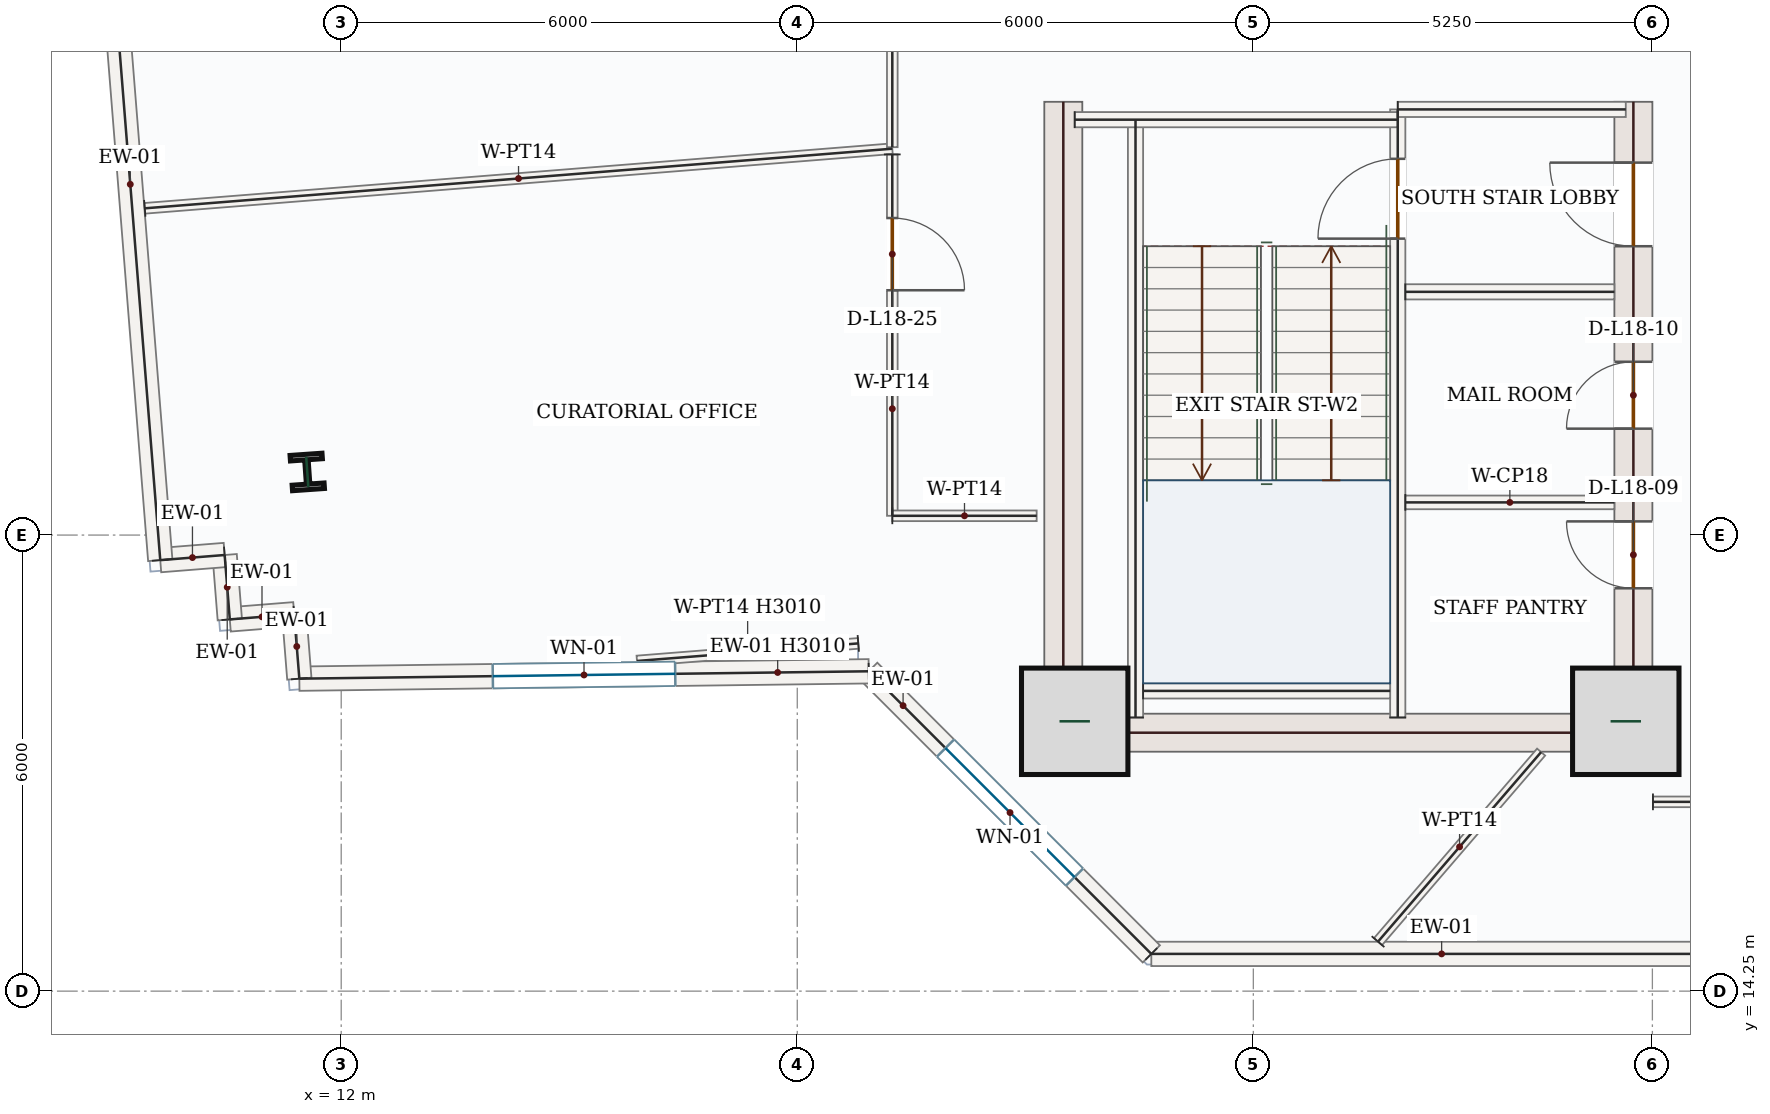
"""IFC4 building model, lengths in metres.
Left out: names, types, materials, properties, quantities, classifications, styles, units other than length and angle.
Written with IfcOpenShell. Run it as: python <this file> out.ifc"""

import sys

from ifc_helpers import new_model, si_unit, direction, frame, frame_2d, origin, origin_2d, place, context, subcontext, project, spatial, rectangle, i_section, extrude, source, transform, mapped, element, fill, save


model = new_model("IFC4")
c1 = context("Model", 3, precision=1e-05, world=origin(), true_north=direction((0.0, 1.0)))
c2 = subcontext(c1, "Body", "Model", "MODEL_VIEW")
j1 = project(units=[si_unit("LENGTHUNIT", "METRE"), si_unit("PLANEANGLEUNIT", "RADIAN")], contexts=[c1])
p1 = place(None, origin())
s1 = spatial("IfcSite", under=j1, at=p1, CompositionType="ELEMENT")
p2 = place(p1, origin())
s2 = spatial("IfcBuilding", under=s1, at=p2, CompositionType="ELEMENT")
p3 = place(p2, frame((0.0, 0.0, 83.7)))
s3 = spatial("IfcBuildingStorey", under=s2, at=p3, CompositionType="ELEMENT", Elevation=83.7)
m1 = source(origin(), c2, "Body", "SweptSolid", [
    extrude(rectangle(XDim=8.55, YDim=0.5, at=frame_2d((4.275, 0.0))), origin(), (0.0, 0.0, 1.0), 3.95),
])
p4 = place(p3, frame((21.5, 17.4, 0.0), z_axis=(0.0, 0.0, 1.0), x_axis=(0.0, 1.0, 0.0)))
e1 = element("IfcWall", 1, at=p4, inside=s3, PredefinedType="SHEAR", context=c2, shape_type="MappedRepresentation", body=[
    mapped(m1, transform((0.0, 0.0, 0.0), x_axis=(1.0, 0.0, 0.0), y_axis=(0.0, 1.0, 0.0), z_axis=(0.0, 0.0, 1.0), scale=1.0)),
])
p5 = place(p3, frame((29.0, 17.4, 0.0), z_axis=(0.0, 0.0, 1.0), x_axis=(0.0, 1.0, 0.0)))
e2 = element("IfcWall", 2, at=p5, inside=s3, PredefinedType="SHEAR", context=c2, shape_type="SweptSolid", body=[
    extrude(rectangle(XDim=8.55, YDim=0.5, at=frame_2d((4.275, 0.0))), origin(), (0.0, 0.0, 1.0), 3.95),
])
p6 = place(p5, frame((6.65, 0.0, 0.0)))
e3 = element("IfcOpeningElement", 3, at=p6, cuts=e2, PredefinedType="OPENING", context=c2, shape_type="SweptSolid", body=[
    extrude(rectangle(XDim=1.1, YDim=2.2, at=frame_2d((0.55, 1.1))), frame((0.0, 0.26, 0.0), z_axis=(0.0, -1.0, 0.0), x_axis=(1.0, 0.0, 0.0)), (0.0, 0.0, 1.0), 0.52),
])
p7 = place(p5, frame((2.15, 0.0, 0.0)))
e4 = element("IfcOpeningElement", 4, at=p7, cuts=e2, PredefinedType="OPENING", context=c2, shape_type="SweptSolid", body=[
    extrude(rectangle(XDim=0.88, YDim=2.1, at=frame_2d((0.44, 1.05))), frame((0.0, 0.26, 0.0), z_axis=(0.0, -1.0, 0.0), x_axis=(1.0, 0.0, 0.0)), (0.0, 0.0, 1.0), 0.52),
])
p8 = place(p5, frame((4.25, 0.0, 0.0)))
e5 = element("IfcOpeningElement", 5, at=p8, cuts=e2, PredefinedType="OPENING", context=c2, shape_type="SweptSolid", body=[
    extrude(rectangle(XDim=0.88, YDim=2.1, at=frame_2d((0.44, 1.05))), frame((0.0, 0.26, 0.0), z_axis=(0.0, -1.0, 0.0), x_axis=(1.0, 0.0, 0.0)), (0.0, 0.0, 1.0), 0.52),
])
m2 = source(origin(), c2, "Body", "SweptSolid", [
    extrude(rectangle(XDim=7.0, YDim=0.5, at=frame_2d((3.5, 0.0))), origin(), (0.0, 0.0, 1.0), 3.95),
])
p9 = place(p3, frame((21.75, 17.65, 0.0), z_axis=(0.0, 0.0, 1.0), x_axis=(1.0, 0.0, 0.0)))
e6 = element("IfcWall", 6, at=p9, inside=s3, PredefinedType="SHEAR", context=c2, shape_type="MappedRepresentation", body=[
    mapped(m2, transform((0.0, 0.0, 0.0), x_axis=(1.0, 0.0, 0.0), y_axis=(0.0, 1.0, 0.0), z_axis=(0.0, 0.0, 1.0), scale=1.0)),
])
m3 = source(origin(), c2, "Body", "SweptSolid", [
    extrude(rectangle(XDim=1.4, YDim=1.4, at=origin_2d()), origin(), (0.0, 0.0, 1.0), 4.2),
])
for number, where, z_axis, x_axis in (
    (7, (21.65, 17.8, 0.0), (0.0, 0.0, 1.0), (1.0, 0.0, 0.0)),
    (8, (28.9, 17.8, 0.0), (0.0, 0.0, 1.0), (1.0, 0.0, 0.0)),
):
    element("IfcColumn", number, at=place(p3, frame(where, z_axis=z_axis, x_axis=x_axis)), inside=s3, PredefinedType="COLUMN", context=c2, shape_type="MappedRepresentation", body=[
        mapped(m3, transform((0.0, 0.0, 0.0), x_axis=(1.0, 0.0, 0.0), y_axis=(0.0, 1.0, 0.0), z_axis=(0.0, 0.0, 1.0), scale=1.0)),
    ])
m4 = source(origin(), c2, "Body", "SweptSolid", [
    extrude(i_section(OverallWidth=0.421, OverallDepth=0.465, WebThickness=0.045, FlangeThickness=0.073, FilletRadius=0.018, at=origin_2d()), origin(), (0.0, 0.0, 1.0), 4.2),
])
p10 = place(p3, frame((11.553, 21.08, 0.0), z_axis=(0.0, 0.0, 1.0), x_axis=(0.99756405026, 0.069756473744, 0.0)))
e9 = element("IfcColumn", 9, at=p10, inside=s3, PredefinedType="COLUMN", context=c2, shape_type="MappedRepresentation", body=[
    mapped(m4, transform((0.0, 0.0, 0.0), x_axis=(1.0, 0.0, 0.0), y_axis=(0.0, 1.0, 0.0), z_axis=(0.0, 0.0, 1.0), scale=1.0)),
])
m5 = source(origin(), c2, "Body", "SweptSolid", [
    extrude(rectangle(XDim=7.639, YDim=0.32, at=frame_2d((3.819, 0.0))), origin(), (0.0, 0.0, 1.0), 3.95),
])
p11 = place(p3, frame((30.297, 14.74, 0.0), z_axis=(0.0, 0.0, 1.0), x_axis=(-1.0, 0.0, 0.0)))
e10 = element("IfcWall", 10, at=p11, inside=s3, PredefinedType="SOLIDWALL", context=c2, shape_type="MappedRepresentation", body=[
    mapped(m5, transform((0.0, 0.0, 0.0), x_axis=(1.0, 0.0, 0.0), y_axis=(0.0, 1.0, 0.0), z_axis=(0.0, 0.0, 1.0), scale=1.0)),
])
p12 = place(p3, frame((22.658, 14.74, 0.0), z_axis=(0.0, 0.0, 1.0), x_axis=(-0.707106781187, 0.707106781187, 0.0)))
e11 = element("IfcWall", 11, at=p12, inside=s3, PredefinedType="SOLIDWALL", context=c2, shape_type="SweptSolid", body=[
    extrude(rectangle(XDim=5.258, YDim=0.32, at=frame_2d((2.629, 0.0))), origin(), (0.0, 0.0, 1.0), 3.95),
])
p13 = place(p12, frame((1.429, 0.0, 0.85)))
e12 = element("IfcOpeningElement", 12, at=p13, cuts=e11, PredefinedType="OPENING", context=c2, shape_type="SweptSolid", body=[
    extrude(rectangle(XDim=2.4, YDim=1.8, at=frame_2d((1.2, 0.9))), frame((0.0, 0.17, 0.0), z_axis=(0.0, -1.0, 0.0), x_axis=(1.0, 0.0, 0.0)), (0.0, 0.0, 1.0), 0.34),
])
p14 = place(p3, frame((18.94, 18.458, 0.0), z_axis=(0.0, 0.0, 1.0), x_axis=(-0.999915877143, -0.012970683759, 0.0)))
e13 = element("IfcWall", 13, at=p14, inside=s3, PredefinedType="SOLIDWALL", context=c2, shape_type="SweptSolid", body=[
    extrude(rectangle(XDim=7.491, YDim=0.32, at=frame_2d((3.746, 0.0))), origin(), (0.0, 0.0, 1.0), 3.01),
])
p15 = place(p14, frame((2.546, 0.0, 0.85)))
e14 = element("IfcOpeningElement", 14, at=p15, cuts=e13, PredefinedType="OPENING", context=c2, shape_type="SweptSolid", body=[
    extrude(rectangle(XDim=2.4, YDim=1.8, at=frame_2d((1.2, 0.9))), frame((0.0, 0.17, 0.0), z_axis=(0.0, -1.0, 0.0), x_axis=(1.0, 0.0, 0.0)), (0.0, 0.0, 1.0), 0.34),
])
m6 = source(origin(), c2, "Body", "SweptSolid", [
    extrude(rectangle(XDim=0.85, YDim=0.32, at=frame_2d((0.425, 0.0))), origin(), (0.0, 0.0, 1.0), 3.95),
])
p16 = place(p3, frame((11.449, 18.361, 0.0), z_axis=(0.0, 0.0, 1.0), x_axis=(-0.079573954853, 0.996828965123, 0.0)))
e15 = element("IfcWall", 15, at=p16, inside=s3, PredefinedType="SOLIDWALL", context=c2, shape_type="MappedRepresentation", body=[
    mapped(m6, transform((0.0, 0.0, 0.0), x_axis=(1.0, 0.0, 0.0), y_axis=(0.0, 1.0, 0.0), z_axis=(0.0, 0.0, 1.0), scale=1.0)),
])
m7 = source(origin(), c2, "Body", "SweptSolid", [
    extrude(rectangle(XDim=0.85, YDim=0.32, at=frame_2d((0.425, 0.0))), origin(), (0.0, 0.0, 1.0), 3.95),
])
for number, where, z_axis, x_axis in (
    (16, (11.382, 19.208, 0.0), (0.0, 0.0, 1.0), (-0.997, -0.08, 0.0)),
    (17, (10.534, 19.14, 0.0), (0.0, 0.0, 1.0), (-0.08, 0.997, 0.0)),
):
    element("IfcWall", number, at=place(p3, frame(where, z_axis=z_axis, x_axis=x_axis)), inside=s3, PredefinedType="SOLIDWALL", context=c2, shape_type="MappedRepresentation", body=[
        mapped(m7, transform((0.0, 0.0, 0.0), x_axis=(1.0, 0.0, 0.0), y_axis=(0.0, 1.0, 0.0), z_axis=(0.0, 0.0, 1.0), scale=1.0)),
    ])
p17 = place(p3, frame((10.467, 19.988, 0.0), z_axis=(0.0, 0.0, 1.0), x_axis=(-0.996851711541, -0.079288493483, 0.0)))
e18 = element("IfcWall", 18, at=p17, inside=s3, PredefinedType="SOLIDWALL", context=c2, shape_type="MappedRepresentation", body=[
    mapped(m6, transform((0.0, 0.0, 0.0), x_axis=(1.0, 0.0, 0.0), y_axis=(0.0, 1.0, 0.0), z_axis=(0.0, 0.0, 1.0), scale=1.0)),
])
m8 = source(origin(), c2, "Body", "SweptSolid", [
    extrude(rectangle(XDim=9.92, YDim=0.32, at=frame_2d((4.96, 0.0))), origin(), (0.0, 0.0, 1.0), 3.95),
])
p18 = place(p3, frame((9.619, 19.92, 0.0), z_axis=(0.0, 0.0, 1.0), x_axis=(-0.07949480177, 0.996835280521, 0.0)))
e19 = element("IfcWall", 19, at=p18, inside=s3, PredefinedType="SOLIDWALL", context=c2, shape_type="MappedRepresentation", body=[
    mapped(m8, transform((0.0, 0.0, 0.0), x_axis=(1.0, 0.0, 0.0), y_axis=(0.0, 1.0, 0.0), z_axis=(0.0, 0.0, 1.0), scale=1.0)),
])
m9 = source(origin(), c2, "Body", "SweptSolid", [
    extrude(rectangle(XDim=7.87, YDim=0.2, at=frame_2d((3.935, 0.0))), origin(), (0.0, 0.0, 1.0), 3.95),
])
p19 = place(p3, frame((22.45, 17.85, 0.0), z_axis=(0.0, 0.0, 1.0), x_axis=(0.0, 1.0, 0.0)))
e20 = element("IfcWall", 20, at=p19, inside=s3, PredefinedType="SOLIDWALL", context=c2, shape_type="MappedRepresentation", body=[
    mapped(m9, transform((0.0, 0.0, 0.0), x_axis=(1.0, 0.0, 0.0), y_axis=(0.0, 1.0, 0.0), z_axis=(0.0, 0.0, 1.0), scale=1.0)),
])
p20 = place(p3, frame((25.9, 17.85, 0.0), z_axis=(0.0, 0.0, 1.0), x_axis=(0.0, 1.0, 0.0)))
e21 = element("IfcWall", 21, at=p20, inside=s3, PredefinedType="SOLIDWALL", context=c2, shape_type="SweptSolid", body=[
    extrude(rectangle(XDim=8.0, YDim=0.2, at=frame_2d((4.0, 0.0))), origin(), (0.0, 0.0, 1.0), 3.95),
])
p21 = place(p20, frame((6.3, 0.0, 0.0)))
e22 = element("IfcOpeningElement", 22, at=p21, cuts=e21, PredefinedType="OPENING", context=c2, shape_type="SweptSolid", body=[
    extrude(rectangle(XDim=1.05, YDim=2.15, at=frame_2d((0.525, 1.075))), frame((0.0, 0.11, 0.0), z_axis=(0.0, -1.0, 0.0), x_axis=(1.0, 0.0, 0.0)), (0.0, 0.0, 1.0), 0.22),
])
m10 = source(origin(), c2, "Body", "SweptSolid", [
    extrude(rectangle(XDim=4.25, YDim=0.2, at=frame_2d((2.125, 0.0))), origin(), (0.0, 0.0, 1.0), 3.95),
])
p22 = place(p3, frame((21.65, 25.715, 0.0), z_axis=(0.0, 0.0, 1.0), x_axis=(1.0, 0.0, 0.0)))
e23 = element("IfcWall", 23, at=p22, inside=s3, PredefinedType="SOLIDWALL", context=c2, shape_type="MappedRepresentation", body=[
    mapped(m10, transform((0.0, 0.0, 0.0), x_axis=(1.0, 0.0, 0.0), y_axis=(0.0, 1.0, 0.0), z_axis=(0.0, 0.0, 1.0), scale=1.0)),
])
m11 = source(origin(), c2, "Body", "SweptSolid", [
    extrude(rectangle(XDim=3.0, YDim=0.2, at=frame_2d((1.5, 0.0))), origin(), (0.0, 0.0, 1.0), 3.95),
])
p23 = place(p3, frame((25.9, 25.85, 0.0), z_axis=(0.0, 0.0, 1.0), x_axis=(1.0, 0.0, 0.0)))
e24 = element("IfcWall", 24, at=p23, inside=s3, PredefinedType="SOLIDWALL", context=c2, shape_type="MappedRepresentation", body=[
    mapped(m11, transform((0.0, 0.0, 0.0), x_axis=(1.0, 0.0, 0.0), y_axis=(0.0, 1.0, 0.0), z_axis=(0.0, 0.0, 1.0), scale=1.0)),
])
m12 = source(origin(), c2, "Body", "SweptSolid", [
    extrude(rectangle(XDim=3.25, YDim=0.2, at=frame_2d((1.625, 0.0))), origin(), (0.0, 0.0, 1.0), 3.95),
])
p24 = place(p3, frame((22.55, 18.2, 0.0), z_axis=(0.0, 0.0, 1.0), x_axis=(1.0, 0.0, 0.0)))
e25 = element("IfcWall", 25, at=p24, inside=s3, PredefinedType="SOLIDWALL", context=c2, shape_type="MappedRepresentation", body=[
    mapped(m12, transform((0.0, 0.0, 0.0), x_axis=(1.0, 0.0, 0.0), y_axis=(0.0, 1.0, 0.0), z_axis=(0.0, 0.0, 1.0), scale=1.0)),
])
m13 = source(origin(), c2, "Body", "SweptSolid", [
    extrude(rectangle(XDim=2.75, YDim=0.2, at=frame_2d((1.375, 0.0))), origin(), (0.0, 0.0, 1.0), 3.95),
])
p25 = place(p3, frame((26.0, 23.45, 0.0), z_axis=(0.0, 0.0, 1.0), x_axis=(1.0, 0.0, 0.0)))
e26 = element("IfcWall", 26, at=p25, inside=s3, PredefinedType="SOLIDWALL", context=c2, shape_type="MappedRepresentation", body=[
    mapped(m13, transform((0.0, 0.0, 0.0), x_axis=(1.0, 0.0, 0.0), y_axis=(0.0, 1.0, 0.0), z_axis=(0.0, 0.0, 1.0), scale=1.0)),
])
m14 = source(origin(), c2, "Body", "SweptSolid", [
    extrude(rectangle(XDim=2.75, YDim=0.18, at=frame_2d((1.375, 0.0))), origin(), (0.0, 0.0, 1.0), 3.95),
])
p26 = place(p3, frame((26.0, 20.68, 0.0), z_axis=(0.0, 0.0, 1.0), x_axis=(1.0, 0.0, 0.0)))
e27 = element("IfcWall", 27, at=p26, inside=s3, PredefinedType="PARTITIONING", context=c2, shape_type="MappedRepresentation", body=[
    mapped(m14, transform((0.0, 0.0, 0.0), x_axis=(1.0, 0.0, 0.0), y_axis=(0.0, 1.0, 0.0), z_axis=(0.0, 0.0, 1.0), scale=1.0)),
])
p27 = place(p3, frame((29.258, 16.74, 0.0), z_axis=(0.0, 0.0, 1.0), x_axis=(0.999999998924, -4.6384341e-05, 0.0)))
e28 = element("IfcWall", 28, at=p27, inside=s3, PredefinedType="PARTITIONING", context=c2, shape_type="SweptSolid", body=[
    extrude(rectangle(XDim=5.263, YDim=0.14, at=frame_2d((2.632, 0.0))), origin(), (0.0, 0.0, 1.0), 3.95),
])
p28 = place(p27, frame((3.365, 0.0, 0.0)))
e29 = element("IfcOpeningElement", 29, at=p28, cuts=e28, PredefinedType="OPENING", context=c2, shape_type="SweptSolid", body=[
    extrude(rectangle(XDim=0.95, YDim=2.15, at=frame_2d((0.475, 1.075))), frame((0.0, 0.08, 0.0), z_axis=(0.0, -1.0, 0.0), x_axis=(1.0, 0.0, 0.0)), (0.0, 0.0, 1.0), 0.16),
])
m15 = source(origin(), c2, "Body", "SweptSolid", [
    extrude(rectangle(XDim=3.29, YDim=0.14, at=frame_2d((1.645, 0.0))), origin(), (0.0, 0.0, 1.0), 3.95),
])
p29 = place(p3, frame((25.64, 14.901, 0.0), z_axis=(0.0, 0.0, 1.0), x_axis=(0.652214149627, 0.758034763732, 0.0)))
e30 = element("IfcWall", 30, at=p29, inside=s3, PredefinedType="PARTITIONING", context=c2, shape_type="MappedRepresentation", body=[
    mapped(m15, transform((0.0, 0.0, 0.0), x_axis=(1.0, 0.0, 0.0), y_axis=(0.0, 1.0, 0.0), z_axis=(0.0, 0.0, 1.0), scale=1.0)),
])
m16 = source(origin(), c2, "Body", "SweptSolid", [
    extrude(rectangle(XDim=2.921, YDim=0.14, at=frame_2d((1.46, 0.0))), origin(), (0.0, 0.0, 1.0), 3.01),
])
p30 = place(p3, frame((18.803, 18.825, 0.0), z_axis=(0.0, 0.0, 1.0), x_axis=(-0.996855023767, -0.079246839625, 0.0)))
e31 = element("IfcWall", 31, at=p30, inside=s3, PredefinedType="PARTITIONING", context=c2, shape_type="MappedRepresentation", body=[
    mapped(m16, transform((0.0, 0.0, 0.0), x_axis=(1.0, 0.0, 0.0), y_axis=(0.0, 1.0, 0.0), z_axis=(0.0, 0.0, 1.0), scale=1.0)),
])
m17 = source(origin(), c2, "Body", "SweptSolid", [
    extrude(rectangle(XDim=9.865, YDim=0.14, at=frame_2d((4.933, 0.0))), origin(), (0.0, 0.0, 1.0), 3.95),
])
p31 = place(p3, frame((9.416, 24.549, 0.0), z_axis=(0.0, 0.0, 1.0), x_axis=(0.996833900052, 0.079512110446, 0.0)))
e32 = element("IfcWall", 32, at=p31, inside=s3, PredefinedType="PARTITIONING", context=c2, shape_type="MappedRepresentation", body=[
    mapped(m17, transform((0.0, 0.0, 0.0), x_axis=(1.0, 0.0, 0.0), y_axis=(0.0, 1.0, 0.0), z_axis=(0.0, 0.0, 1.0), scale=1.0)),
])
p32 = place(p3, frame((19.25, 25.258, 0.0), z_axis=(0.0, 0.0, 1.0), x_axis=(0.000102701037, -0.999999994726, 0.0)))
e33 = element("IfcWall", 33, at=p32, inside=s3, PredefinedType="PARTITIONING", context=c2, shape_type="SweptSolid", body=[
    extrude(rectangle(XDim=4.754, YDim=0.14, at=frame_2d((2.377, 0.0))), origin(), (0.0, 0.0, 1.0), 3.95),
])
p33 = place(p32, frame((0.837, 0.0, 0.0)))
e34 = element("IfcOpeningElement", 34, at=p33, cuts=e33, PredefinedType="OPENING", context=c2, shape_type="SweptSolid", body=[
    extrude(rectangle(XDim=0.95, YDim=2.15, at=frame_2d((0.475, 1.075))), frame((0.0, 0.08, 0.0), z_axis=(0.0, -1.0, 0.0), x_axis=(1.0, 0.0, 0.0)), (0.0, 0.0, 1.0), 0.16),
])
m18 = source(origin(), c2, "Body", "SweptSolid", [
    extrude(rectangle(XDim=1.899, YDim=0.14, at=frame_2d((0.949, 0.0))), origin(), (0.0, 0.0, 1.0), 3.95),
])
p34 = place(p3, frame((19.25, 20.503, 0.0), z_axis=(0.0, 0.0, 1.0), x_axis=(0.999999991735, 0.000128567754, 0.0)))
e35 = element("IfcWall", 35, at=p34, inside=s3, PredefinedType="PARTITIONING", context=c2, shape_type="MappedRepresentation", body=[
    mapped(m18, transform((0.0, 0.0, 0.0), x_axis=(1.0, 0.0, 0.0), y_axis=(0.0, 1.0, 0.0), z_axis=(0.0, 0.0, 1.0), scale=1.0)),
])
p35 = place(p3, frame((19.253, 33.497, 0.0), z_axis=(0.0, 0.0, 1.0), x_axis=(-0.000329746078, -0.999999945634, 0.0)))
e36 = element("IfcWall", 36, at=p35, inside=s3, PredefinedType="PARTITIONING", context=c2, shape_type="SweptSolid", body=[
    extrude(rectangle(XDim=8.144, YDim=0.14, at=frame_2d((4.072, 0.0))), origin(), (0.0, 0.0, 1.0), 3.95),
])
p36 = place(p35, frame((5.611, 0.0, 0.0)))
e37 = element("IfcOpeningElement", 37, at=p36, cuts=e36, PredefinedType="OPENING", context=c2, shape_type="SweptSolid", body=[
    extrude(rectangle(XDim=0.95, YDim=2.15, at=frame_2d((0.475, 1.075))), frame((0.0, 0.08, 0.0), z_axis=(0.0, -1.0, 0.0), x_axis=(1.0, 0.0, 0.0)), (0.0, 0.0, 1.0), 0.16),
])
m19 = source(origin(), c2, "Body", "SweptSolid", [
    extrude(rectangle(XDim=2.4, YDim=1.8, at=frame_2d((1.2, 0.9))), frame((0.0, 0.03, 0.0), z_axis=(0.0, -1.0, 0.0), x_axis=(1.0, 0.0, 0.0)), (0.0, 0.0, 1.0), 0.06),
])
p37 = place(p13, origin())
e38 = element("IfcWindow", 38, at=p37, inside=s3, PartitioningType="DOUBLE_PANEL_VERTICAL", PredefinedType="WINDOW", context=c2, shape_type="MappedRepresentation", body=[
    mapped(m19, transform((0.0, 0.0, 0.0), x_axis=(1.0, 0.0, 0.0), y_axis=(0.0, 1.0, 0.0), z_axis=(0.0, 0.0, 1.0), scale=1.0)),
])
fill(e12, e38)
p38 = place(p15, origin())
e39 = element("IfcWindow", 39, at=p38, inside=s3, PartitioningType="DOUBLE_PANEL_VERTICAL", PredefinedType="WINDOW", context=c2, shape_type="MappedRepresentation", body=[
    mapped(m19, transform((0.0, 0.0, 0.0), x_axis=(1.0, 0.0, 0.0), y_axis=(0.0, 1.0, 0.0), z_axis=(0.0, 0.0, 1.0), scale=1.0)),
])
fill(e14, e39)
m20 = source(origin(), c2, "Body", "SweptSolid", [
    extrude(rectangle(XDim=1.05, YDim=2.15, at=frame_2d((0.525, 1.075))), frame((0.0, 0.025, 0.0), z_axis=(0.0, -1.0, 0.0), x_axis=(1.0, 0.0, 0.0)), (0.0, 0.0, 1.0), 0.05),
])
p39 = place(p21, origin())
e40 = element("IfcDoor", 40, at=p39, inside=s3, OperationType="SINGLE_SWING_LEFT", PredefinedType="DOOR", context=c2, shape_type="MappedRepresentation", body=[
    mapped(m20, transform((0.0, 0.0, 0.0), x_axis=(1.0, 0.0, 0.0), y_axis=(0.0, 1.0, 0.0), z_axis=(0.0, 0.0, 1.0), scale=1.0)),
])
fill(e22, e40)
m21 = source(origin(), c2, "Body", "SweptSolid", [
    extrude(rectangle(XDim=1.1, YDim=2.2, at=frame_2d((0.55, 1.1))), frame((0.0, 0.025, 0.0), z_axis=(0.0, -1.0, 0.0), x_axis=(1.0, 0.0, 0.0)), (0.0, 0.0, 1.0), 0.05),
])
p40 = place(p6, origin())
e41 = element("IfcDoor", 41, at=p40, inside=s3, OperationType="SINGLE_SWING_RIGHT", PredefinedType="DOOR", context=c2, shape_type="MappedRepresentation", body=[
    mapped(m21, transform((0.0, 0.0, 0.0), x_axis=(1.0, 0.0, 0.0), y_axis=(0.0, 1.0, 0.0), z_axis=(0.0, 0.0, 1.0), scale=1.0)),
])
fill(e3, e41)
m22 = source(origin(), c2, "Body", "SweptSolid", [
    extrude(rectangle(XDim=0.88, YDim=2.1, at=frame_2d((0.44, 1.05))), frame((0.0, 0.025, 0.0), z_axis=(0.0, -1.0, 0.0), x_axis=(1.0, 0.0, 0.0)), (0.0, 0.0, 1.0), 0.05),
])
p41 = place(p7, origin())
e42 = element("IfcDoor", 42, at=p41, inside=s3, OperationType="SINGLE_SWING_RIGHT", PredefinedType="DOOR", context=c2, shape_type="MappedRepresentation", body=[
    mapped(m22, transform((0.0, 0.0, 0.0), x_axis=(1.0, 0.0, 0.0), y_axis=(0.0, 1.0, 0.0), z_axis=(0.0, 0.0, 1.0), scale=1.0)),
])
fill(e4, e42)
p42 = place(p8, origin())
e43 = element("IfcDoor", 43, at=p42, inside=s3, OperationType="SINGLE_SWING_LEFT", PredefinedType="DOOR", context=c2, shape_type="MappedRepresentation", body=[
    mapped(m22, transform((0.0, 0.0, 0.0), x_axis=(1.0, 0.0, 0.0), y_axis=(0.0, 1.0, 0.0), z_axis=(0.0, 0.0, 1.0), scale=1.0)),
])
fill(e5, e43)
m23 = source(origin(), c2, "Body", "SweptSolid", [
    extrude(rectangle(XDim=0.95, YDim=2.15, at=frame_2d((0.475, 1.075))), frame((0.0, 0.025, 0.0), z_axis=(0.0, -1.0, 0.0), x_axis=(1.0, 0.0, 0.0)), (0.0, 0.0, 1.0), 0.05),
])
p43 = place(p33, origin())
e44 = element("IfcDoor", 44, at=p43, inside=s3, OperationType="SINGLE_SWING_RIGHT", PredefinedType="DOOR", context=c2, shape_type="MappedRepresentation", body=[
    mapped(m23, transform((0.0, 0.0, 0.0), x_axis=(1.0, 0.0, 0.0), y_axis=(0.0, 1.0, 0.0), z_axis=(0.0, 0.0, 1.0), scale=1.0)),
])
fill(e34, e44)
save(model, sys.argv[1])
